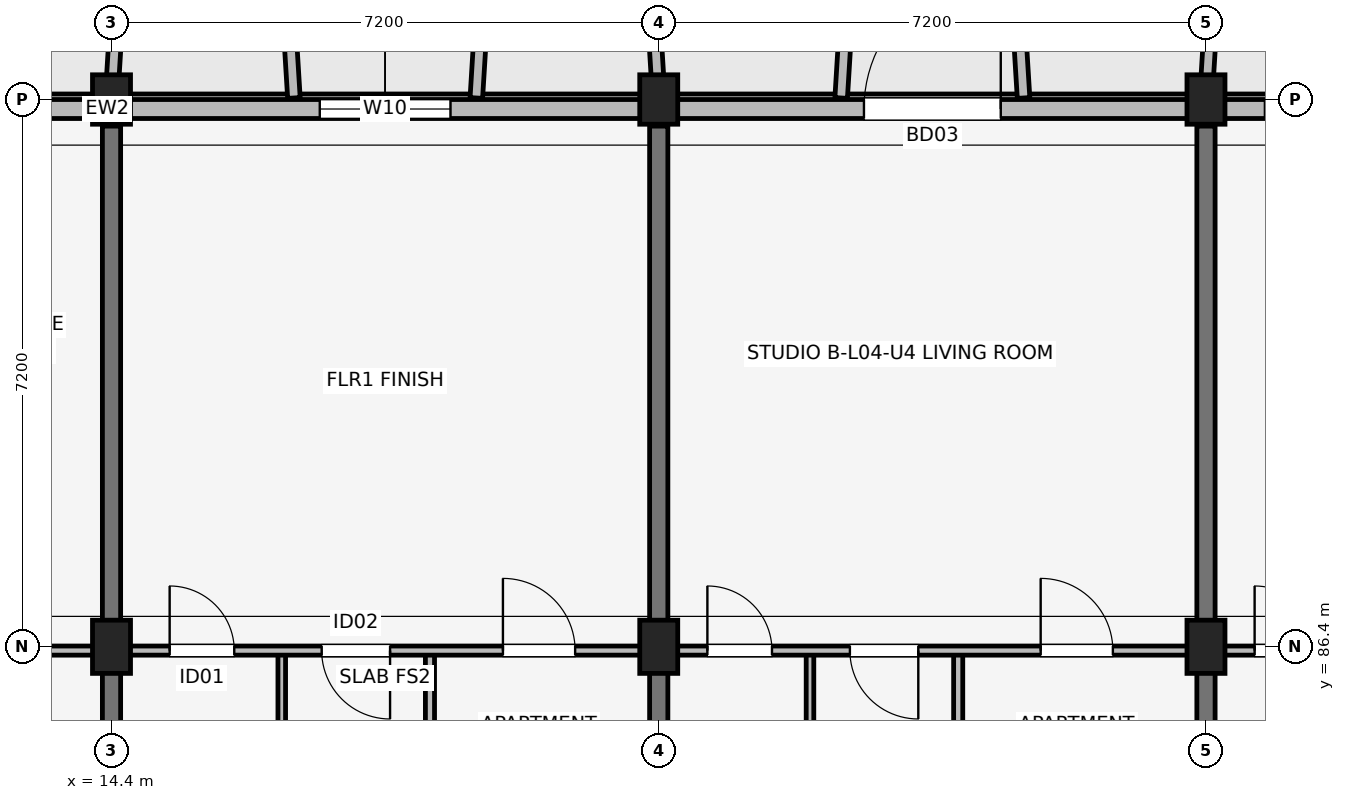
"""IFC4 building model, lengths in metres.
Left out: names, types, materials, properties, quantities, classifications, styles, units other than length and angle.
Written with IfcOpenShell. Run it as: python <this file> out.ifc"""

import sys

from ifc_helpers import new_model, si_unit, direction, frame, frame_2d, origin, origin_2d, place, context, subcontext, project, spatial, rectangle, extrude, element, fill, save


model = new_model("IFC4")
c1 = context("Model", 3, precision=1e-05, world=origin(), true_north=direction((0.0, 1.0)))
c2 = subcontext(c1, "Body", "Model", "MODEL_VIEW")
j1 = project(units=[si_unit("LENGTHUNIT", "METRE"), si_unit("PLANEANGLEUNIT", "RADIAN")], contexts=[c1])
p1 = place(None, origin())
s1 = spatial("IfcSite", under=j1, at=p1, CompositionType="ELEMENT")
p2 = place(p1, origin())
s2 = spatial("IfcBuilding", under=s1, at=p2, CompositionType="ELEMENT")
p3 = place(p2, frame((0.0, 0.0, 15.0)))
s3 = spatial("IfcBuildingStorey", under=s2, at=p3, CompositionType="ELEMENT", Elevation=15.0)
p4 = place(p3, frame((14.4, 86.4, 0.0), z_axis=(0.0, 0.0, 1.0), x_axis=(1.0, 0.0, 0.0)))
e1 = element("IfcColumn", 1, at=p4, inside=s3, PredefinedType="COLUMN", context=c2, shape_type="SweptSolid", body=[
    extrude(rectangle(XDim=0.5, YDim=0.7, at=origin_2d()), origin(), (0.0, 0.0, 1.0), 3.15),
])
p5 = place(p3, frame((14.4, 93.6, 0.0), z_axis=(0.0, 0.0, 1.0), x_axis=(1.0, 0.0, 0.0)))
e2 = element("IfcColumn", 2, at=p5, inside=s3, PredefinedType="COLUMN", context=c2, shape_type="SweptSolid", body=[
    extrude(rectangle(XDim=0.5, YDim=0.65, at=origin_2d()), origin(), (0.0, 0.0, 1.0), 3.15),
])
p6 = place(p3, frame((21.6, 86.4, 0.0), z_axis=(0.0, 0.0, 1.0), x_axis=(1.0, 0.0, 0.0)))
e3 = element("IfcColumn", 3, at=p6, inside=s3, PredefinedType="COLUMN", context=c2, shape_type="SweptSolid", body=[
    extrude(rectangle(XDim=0.5, YDim=0.7, at=origin_2d()), origin(), (0.0, 0.0, 1.0), 3.15),
])
p7 = place(p3, frame((21.6, 93.6, 0.0), z_axis=(0.0, 0.0, 1.0), x_axis=(1.0, 0.0, 0.0)))
e4 = element("IfcColumn", 4, at=p7, inside=s3, PredefinedType="COLUMN", context=c2, shape_type="SweptSolid", body=[
    extrude(rectangle(XDim=0.5, YDim=0.65, at=origin_2d()), origin(), (0.0, 0.0, 1.0), 3.15),
])
p8 = place(p3, frame((28.8, 86.4, 0.0), z_axis=(0.0, 0.0, 1.0), x_axis=(1.0, 0.0, 0.0)))
e5 = element("IfcColumn", 5, at=p8, inside=s3, PredefinedType="COLUMN", context=c2, shape_type="SweptSolid", body=[
    extrude(rectangle(XDim=0.5, YDim=0.7, at=origin_2d()), origin(), (0.0, 0.0, 1.0), 3.15),
])
p9 = place(p3, frame((28.8, 93.6, 0.0), z_axis=(0.0, 0.0, 1.0), x_axis=(1.0, 0.0, 0.0)))
e6 = element("IfcColumn", 6, at=p9, inside=s3, PredefinedType="COLUMN", context=c2, shape_type="SweptSolid", body=[
    extrude(rectangle(XDim=0.5, YDim=0.65, at=origin_2d()), origin(), (0.0, 0.0, 1.0), 3.15),
])
for number, where, z_axis, x_axis in (
    (7, (14.4, 83.85, 0.0), (0.0, 0.0, 1.0), (0.0, 1.0, 0.0)),
    (8, (21.6, 83.85, 0.0), (0.0, 0.0, 1.0), (0.0, 1.0, 0.0)),
    (9, (28.8, 83.85, 0.0), (0.0, 0.0, 1.0), (0.0, 1.0, 0.0)),
):
    element("IfcWall", number, at=place(p3, frame(where, z_axis=z_axis, x_axis=x_axis)), inside=s3, PredefinedType="SHEAR", context=c2, shape_type="SweptSolid", body=[
        extrude(rectangle(XDim=9.4, YDim=0.24, at=frame_2d((4.7, 0.0))), origin(), (0.0, 0.0, 1.0), 3.15),
    ])
p10 = place(p3, frame((32.8, 93.475, 0.0), z_axis=(0.0, 0.0, 1.0), x_axis=(-1.0, 0.0, 0.0)))
e10 = element("IfcWall", 10, at=p10, inside=s3, PredefinedType="SOLIDWALL", context=c2, shape_type="SweptSolid", body=[
    extrude(rectangle(XDim=29.6, YDim=0.25, at=frame_2d((14.8, 0.0))), origin(), (0.0, 0.0, 1.0), 2.43),
])
p11 = place(p10, frame((22.75, 0.0, 0.0), z_axis=(0.0, 0.0, 1.0), x_axis=(-1.0, 0.0, 0.0)))
e11 = element("IfcOpeningElement", 11, at=p11, cuts=e10, PredefinedType="OPENING", context=c2, shape_type="SweptSolid", body=[
    extrude(rectangle(XDim=1.5, YDim=2.15, at=frame_2d((0.75, 1.075))), frame((0.0, 0.135, 0.0), z_axis=(0.0, -1.0, 0.0), x_axis=(1.0, 0.0, 0.0)), (0.0, 0.0, 1.0), 0.27),
])
p12 = place(p10, frame((8.5, 0.0, 0.0), z_axis=(0.0, 0.0, 1.0), x_axis=(-1.0, 0.0, 0.0)))
e12 = element("IfcOpeningElement", 12, at=p12, cuts=e10, PredefinedType="OPENING", context=c2, shape_type="SweptSolid", body=[
    extrude(rectangle(XDim=1.8, YDim=2.15, at=frame_2d((0.9, 1.075))), frame((0.0, 0.135, 0.0), z_axis=(0.0, -1.0, 0.0), x_axis=(1.0, 0.0, 0.0)), (0.0, 0.0, 1.0), 0.27),
])
p13 = place(p10, frame((26.015, 0.0, 0.7)))
e13 = element("IfcOpeningElement", 13, at=p13, cuts=e10, PredefinedType="OPENING", context=c2, shape_type="SweptSolid", body=[
    extrude(rectangle(XDim=1.86, YDim=1.6, at=frame_2d((0.93, 0.8))), frame((0.0, 0.135, 0.0), z_axis=(0.0, -1.0, 0.0), x_axis=(1.0, 0.0, 0.0)), (0.0, 0.0, 1.0), 0.27),
])
p14 = place(p10, frame((23.61, 0.0, 0.75)))
e14 = element("IfcOpeningElement", 14, at=p14, cuts=e10, PredefinedType="OPENING", context=c2, shape_type="SweptSolid", body=[
    extrude(rectangle(XDim=1.46, YDim=1.55, at=frame_2d((0.73, 0.775))), frame((0.0, 0.135, 0.0), z_axis=(0.0, -1.0, 0.0), x_axis=(1.0, 0.0, 0.0)), (0.0, 0.0, 1.0), 0.27),
])
p15 = place(p10, frame((13.94, 0.0, 0.7)))
e15 = element("IfcOpeningElement", 15, at=p15, cuts=e10, PredefinedType="OPENING", context=c2, shape_type="SweptSolid", body=[
    extrude(rectangle(XDim=1.72, YDim=1.6, at=frame_2d((0.86, 0.8))), frame((0.0, 0.135, 0.0), z_axis=(0.0, -1.0, 0.0), x_axis=(1.0, 0.0, 0.0)), (0.0, 0.0, 1.0), 0.27),
])
p16 = place(p10, frame((2.505, 0.0, 0.75)))
e16 = element("IfcOpeningElement", 16, at=p16, cuts=e10, PredefinedType="OPENING", context=c2, shape_type="SweptSolid", body=[
    extrude(rectangle(XDim=0.72, YDim=1.35, at=frame_2d((0.36, 0.675))), frame((0.0, 0.135, 0.0), z_axis=(0.0, -1.0, 0.0), x_axis=(1.0, 0.0, 0.0)), (0.0, 0.0, 1.0), 0.27),
])
p17 = place(p10, frame((0.46, 0.0, 0.75)))
e17 = element("IfcOpeningElement", 17, at=p17, cuts=e10, PredefinedType="OPENING", context=c2, shape_type="SweptSolid", body=[
    extrude(rectangle(XDim=0.85, YDim=1.4, at=frame_2d((0.425, 0.7))), frame((0.0, 0.135, 0.0), z_axis=(0.0, -1.0, 0.0), x_axis=(1.0, 0.0, 0.0)), (0.0, 0.0, 1.0), 0.27),
])
p18 = place(p3, frame((14.4, 93.62, 0.0), z_axis=(0.0, 0.0, 1.0), x_axis=(0.061170732449, 0.998127317276, 0.0)))
e18 = element("IfcWall", 18, at=p18, inside=s3, PredefinedType="ELEMENTEDWALL", context=c2, shape_type="SweptSolid", body=[
    extrude(rectangle(XDim=1.964, YDim=0.165, at=frame_2d((0.982, 0.0))), origin(), (0.0, 0.0, 1.0), 2.95),
])
for number, where, z_axis, x_axis in (
    (19, (16.8, 93.62, 0.0), (0.0, 0.0, 1.0), (-0.061, 0.998, 0.0)),
    (20, (19.2, 93.62, 0.0), (0.0, 0.0, 1.0), (0.061, 0.998, 0.0)),
):
    element("IfcWall", number, at=place(p3, frame(where, z_axis=z_axis, x_axis=x_axis)), inside=s3, PredefinedType="ELEMENTEDWALL", context=c2, shape_type="SweptSolid", body=[
        extrude(rectangle(XDim=1.964, YDim=0.165, at=frame_2d((0.982, 0.0))), origin(), (0.0, 0.0, 1.0), 2.53),
    ])
p19 = place(p3, frame((21.6, 93.62, 0.0), z_axis=(0.0, 0.0, 1.0), x_axis=(-0.061170732449, 0.998127317276, 0.0)))
e21 = element("IfcWall", 21, at=p19, inside=s3, PredefinedType="ELEMENTEDWALL", context=c2, shape_type="SweptSolid", body=[
    extrude(rectangle(XDim=1.964, YDim=0.165, at=frame_2d((0.982, 0.0))), origin(), (0.0, 0.0, 1.0), 2.95),
])
for number, where, z_axis, x_axis in (
    (22, (24.0, 93.62, 0.0), (0.0, 0.0, 1.0), (0.061, 0.998, 0.0)),
    (23, (26.4, 93.62, 0.0), (0.0, 0.0, 1.0), (-0.061, 0.998, 0.0)),
):
    element("IfcWall", number, at=place(p3, frame(where, z_axis=z_axis, x_axis=x_axis)), inside=s3, PredefinedType="ELEMENTEDWALL", context=c2, shape_type="SweptSolid", body=[
        extrude(rectangle(XDim=1.964, YDim=0.165, at=frame_2d((0.982, 0.0))), origin(), (0.0, 0.0, 1.0), 2.48),
    ])
p20 = place(p3, frame((28.8, 93.62, 0.0), z_axis=(0.0, 0.0, 1.0), x_axis=(0.061046865508, 0.998134900808, 0.0)))
e24 = element("IfcWall", 24, at=p20, inside=s3, PredefinedType="ELEMENTEDWALL", context=c2, shape_type="SweptSolid", body=[
    extrude(rectangle(XDim=1.964, YDim=0.165, at=frame_2d((0.982, 0.0))), origin(), (0.0, 0.0, 1.0), 2.95),
])
p21 = place(p3, frame((7.34, 86.35, 0.0), z_axis=(0.0, 0.0, 1.0), x_axis=(1.0, 0.0, 0.0)))
e25 = element("IfcWall", 25, at=p21, inside=s3, PredefinedType="PARTITIONING", context=c2, shape_type="SweptSolid", body=[
    extrude(rectangle(XDim=6.92, YDim=0.12, at=frame_2d((3.46, 0.0))), origin(), (0.0, 0.0, 1.0), 2.375),
])
p22 = place(p21, frame((1.475, 0.0, 0.0), z_axis=(0.0, 0.0, 1.0), x_axis=(-1.0, 0.0, 0.0)))
e26 = element("IfcOpeningElement", 26, at=p22, cuts=e25, PredefinedType="OPENING", context=c2, shape_type="SweptSolid", body=[
    extrude(rectangle(XDim=0.85, YDim=2.08, at=frame_2d((0.425, 1.04))), frame((0.0, 0.07, 0.0), z_axis=(0.0, -1.0, 0.0), x_axis=(1.0, 0.0, 0.0)), (0.0, 0.0, 1.0), 0.14),
])
p23 = place(p21, frame((2.775, 0.0, 0.0)))
e27 = element("IfcOpeningElement", 27, at=p23, cuts=e25, PredefinedType="OPENING", context=c2, shape_type="SweptSolid", body=[
    extrude(rectangle(XDim=0.9, YDim=2.08, at=frame_2d((0.45, 1.04))), frame((0.0, 0.07, 0.0), z_axis=(0.0, -1.0, 0.0), x_axis=(1.0, 0.0, 0.0)), (0.0, 0.0, 1.0), 0.14),
])
p24 = place(p21, frame((6.11, 0.0, 0.0), z_axis=(0.0, 0.0, 1.0), x_axis=(-1.0, 0.0, 0.0)))
e28 = element("IfcOpeningElement", 28, at=p24, cuts=e25, PredefinedType="OPENING", context=c2, shape_type="SweptSolid", body=[
    extrude(rectangle(XDim=0.95, YDim=2.08, at=frame_2d((0.475, 1.04))), frame((0.0, 0.07, 0.0), z_axis=(0.0, -1.0, 0.0), x_axis=(1.0, 0.0, 0.0)), (0.0, 0.0, 1.0), 0.14),
])
p25 = place(p3, frame((16.64, 83.7, 0.0), z_axis=(0.0, 0.0, 1.0), x_axis=(0.0, 1.0, 0.0)))
e29 = element("IfcWall", 29, at=p25, inside=s3, PredefinedType="PARTITIONING", context=c2, shape_type="SweptSolid", body=[
    extrude(rectangle(XDim=2.65, YDim=0.1, at=frame_2d((1.325, 0.0))), origin(), (0.0, 0.0, 1.0), 2.375),
])
p26 = place(p3, frame((18.59, 83.7, 0.0), z_axis=(0.0, 0.0, 1.0), x_axis=(0.0, 1.0, 0.0)))
e30 = element("IfcWall", 30, at=p26, inside=s3, PredefinedType="PARTITIONING", context=c2, shape_type="SweptSolid", body=[
    extrude(rectangle(XDim=2.65, YDim=0.12, at=frame_2d((1.325, 0.0))), origin(), (0.0, 0.0, 1.0), 2.375),
])
p27 = place(p3, frame((14.54, 86.35, 0.0), z_axis=(0.0, 0.0, 1.0), x_axis=(1.0, 0.0, 0.0)))
e31 = element("IfcWall", 31, at=p27, inside=s3, PredefinedType="PARTITIONING", context=c2, shape_type="SweptSolid", body=[
    extrude(rectangle(XDim=6.92, YDim=0.12, at=frame_2d((3.46, 0.0))), origin(), (0.0, 0.0, 1.0), 2.375),
])
p28 = place(p27, frame((0.625, 0.0, 0.0)))
e32 = element("IfcOpeningElement", 32, at=p28, cuts=e31, PredefinedType="OPENING", context=c2, shape_type="SweptSolid", body=[
    extrude(rectangle(XDim=0.85, YDim=2.08, at=frame_2d((0.425, 1.04))), frame((0.0, 0.07, 0.0), z_axis=(0.0, -1.0, 0.0), x_axis=(1.0, 0.0, 0.0)), (0.0, 0.0, 1.0), 0.14),
])
p29 = place(p27, frame((3.525, 0.0, 0.0), z_axis=(0.0, 0.0, 1.0), x_axis=(-1.0, 0.0, 0.0)))
e33 = element("IfcOpeningElement", 33, at=p29, cuts=e31, PredefinedType="OPENING", context=c2, shape_type="SweptSolid", body=[
    extrude(rectangle(XDim=0.9, YDim=2.08, at=frame_2d((0.45, 1.04))), frame((0.0, 0.07, 0.0), z_axis=(0.0, -1.0, 0.0), x_axis=(1.0, 0.0, 0.0)), (0.0, 0.0, 1.0), 0.14),
])
p30 = place(p27, frame((5.01, 0.0, 0.0)))
e34 = element("IfcOpeningElement", 34, at=p30, cuts=e31, PredefinedType="OPENING", context=c2, shape_type="SweptSolid", body=[
    extrude(rectangle(XDim=0.95, YDim=2.08, at=frame_2d((0.475, 1.04))), frame((0.0, 0.07, 0.0), z_axis=(0.0, -1.0, 0.0), x_axis=(1.0, 0.0, 0.0)), (0.0, 0.0, 1.0), 0.14),
])
p31 = place(p3, frame((23.59, 83.7, 0.0), z_axis=(0.0, 0.0, 1.0), x_axis=(0.0, 1.0, 0.0)))
e35 = element("IfcWall", 35, at=p31, inside=s3, PredefinedType="PARTITIONING", context=c2, shape_type="SweptSolid", body=[
    extrude(rectangle(XDim=2.65, YDim=0.1, at=frame_2d((1.325, 0.0))), origin(), (0.0, 0.0, 1.0), 2.375),
])
p32 = place(p3, frame((25.54, 83.7, 0.0), z_axis=(0.0, 0.0, 1.0), x_axis=(0.0, 1.0, 0.0)))
e36 = element("IfcWall", 36, at=p32, inside=s3, PredefinedType="PARTITIONING", context=c2, shape_type="SweptSolid", body=[
    extrude(rectangle(XDim=2.65, YDim=0.12, at=frame_2d((1.325, 0.0))), origin(), (0.0, 0.0, 1.0), 2.375),
])
p33 = place(p3, frame((21.74, 86.35, 0.0), z_axis=(0.0, 0.0, 1.0), x_axis=(1.0, 0.0, 0.0)))
e37 = element("IfcWall", 37, at=p33, inside=s3, PredefinedType="PARTITIONING", context=c2, shape_type="SweptSolid", body=[
    extrude(rectangle(XDim=6.92, YDim=0.12, at=frame_2d((3.46, 0.0))), origin(), (0.0, 0.0, 1.0), 2.375),
])
p34 = place(p33, frame((0.5, 0.0, 0.0)))
e38 = element("IfcOpeningElement", 38, at=p34, cuts=e37, PredefinedType="OPENING", context=c2, shape_type="SweptSolid", body=[
    extrude(rectangle(XDim=0.85, YDim=2.08, at=frame_2d((0.425, 1.04))), frame((0.0, 0.07, 0.0), z_axis=(0.0, -1.0, 0.0), x_axis=(1.0, 0.0, 0.0)), (0.0, 0.0, 1.0), 0.14),
])
p35 = place(p33, frame((3.275, 0.0, 0.0), z_axis=(0.0, 0.0, 1.0), x_axis=(-1.0, 0.0, 0.0)))
e39 = element("IfcOpeningElement", 39, at=p35, cuts=e37, PredefinedType="OPENING", context=c2, shape_type="SweptSolid", body=[
    extrude(rectangle(XDim=0.9, YDim=2.08, at=frame_2d((0.45, 1.04))), frame((0.0, 0.07, 0.0), z_axis=(0.0, -1.0, 0.0), x_axis=(1.0, 0.0, 0.0)), (0.0, 0.0, 1.0), 0.14),
])
p36 = place(p33, frame((4.885, 0.0, 0.0)))
e40 = element("IfcOpeningElement", 40, at=p36, cuts=e37, PredefinedType="OPENING", context=c2, shape_type="SweptSolid", body=[
    extrude(rectangle(XDim=0.95, YDim=2.08, at=frame_2d((0.475, 1.04))), frame((0.0, 0.07, 0.0), z_axis=(0.0, -1.0, 0.0), x_axis=(1.0, 0.0, 0.0)), (0.0, 0.0, 1.0), 0.14),
])
p37 = place(p3, frame((28.94, 86.35, 0.0), z_axis=(0.0, 0.0, 1.0), x_axis=(1.0, 0.0, 0.0)))
e41 = element("IfcWall", 41, at=p37, inside=s3, PredefinedType="PARTITIONING", context=c2, shape_type="SweptSolid", body=[
    extrude(rectangle(XDim=6.92, YDim=0.12, at=frame_2d((3.46, 0.0))), origin(), (0.0, 0.0, 1.0), 2.375),
])
p38 = place(p37, frame((0.5, 0.0, 0.0)))
e42 = element("IfcOpeningElement", 42, at=p38, cuts=e41, PredefinedType="OPENING", context=c2, shape_type="SweptSolid", body=[
    extrude(rectangle(XDim=0.85, YDim=2.08, at=frame_2d((0.425, 1.04))), frame((0.0, 0.07, 0.0), z_axis=(0.0, -1.0, 0.0), x_axis=(1.0, 0.0, 0.0)), (0.0, 0.0, 1.0), 0.14),
])
p39 = place(p37, frame((3.155, 0.0, 0.0), z_axis=(0.0, 0.0, 1.0), x_axis=(-1.0, 0.0, 0.0)))
e43 = element("IfcOpeningElement", 43, at=p39, cuts=e41, PredefinedType="OPENING", context=c2, shape_type="SweptSolid", body=[
    extrude(rectangle(XDim=0.9, YDim=2.08, at=frame_2d((0.45, 1.04))), frame((0.0, 0.07, 0.0), z_axis=(0.0, -1.0, 0.0), x_axis=(1.0, 0.0, 0.0)), (0.0, 0.0, 1.0), 0.14),
])
p40 = place(p37, frame((3.91, 0.0, 0.0)))
e44 = element("IfcOpeningElement", 44, at=p40, cuts=e41, PredefinedType="OPENING", context=c2, shape_type="SweptSolid", body=[
    extrude(rectangle(XDim=0.95, YDim=2.08, at=frame_2d((0.475, 1.04))), frame((0.0, 0.07, 0.0), z_axis=(0.0, -1.0, 0.0), x_axis=(1.0, 0.0, 0.0)), (0.0, 0.0, 1.0), 0.14),
])
p41 = place(p12, origin())
e45 = element("IfcDoor", 45, at=p41, inside=s3, OperationType="SINGLE_SWING_LEFT", PredefinedType="DOOR", context=c2, shape_type="SweptSolid", body=[
    extrude(rectangle(XDim=1.8, YDim=2.15, at=frame_2d((0.9, 1.075))), frame((0.0, 0.025, 0.0), z_axis=(0.0, -1.0, 0.0), x_axis=(1.0, 0.0, 0.0)), (0.0, 0.0, 1.0), 0.05),
])
fill(e12, e45)
p42 = place(p15, origin())
e46 = element("IfcWindow", 46, at=p42, inside=s3, PartitioningType="SINGLE_PANEL", PredefinedType="WINDOW", context=c2, shape_type="SweptSolid", body=[
    extrude(rectangle(XDim=1.72, YDim=1.6, at=frame_2d((0.86, 0.8))), frame((0.0, 0.03, 0.0), z_axis=(0.0, -1.0, 0.0), x_axis=(1.0, 0.0, 0.0)), (0.0, 0.0, 1.0), 0.06),
])
fill(e15, e46)
p43 = place(p16, origin())
e47 = element("IfcWindow", 47, at=p43, inside=s3, PartitioningType="SINGLE_PANEL", PredefinedType="WINDOW", context=c2, shape_type="SweptSolid", body=[
    extrude(rectangle(XDim=0.72, YDim=1.35, at=frame_2d((0.36, 0.675))), frame((0.0, 0.03, 0.0), z_axis=(0.0, -1.0, 0.0), x_axis=(1.0, 0.0, 0.0)), (0.0, 0.0, 1.0), 0.06),
])
fill(e16, e47)
p44 = place(p28, origin())
e48 = element("IfcDoor", 48, at=p44, inside=s3, OperationType="SINGLE_SWING_LEFT", PredefinedType="DOOR", context=c2, shape_type="SweptSolid", body=[
    extrude(rectangle(XDim=0.85, YDim=2.08, at=frame_2d((0.425, 1.04))), frame((0.0, 0.025, 0.0), z_axis=(0.0, -1.0, 0.0), x_axis=(1.0, 0.0, 0.0)), (0.0, 0.0, 1.0), 0.05),
])
fill(e32, e48)
p45 = place(p29, origin())
e49 = element("IfcDoor", 49, at=p45, inside=s3, OperationType="SINGLE_SWING_RIGHT", PredefinedType="DOOR", context=c2, shape_type="SweptSolid", body=[
    extrude(rectangle(XDim=0.9, YDim=2.08, at=frame_2d((0.45, 1.04))), frame((0.0, 0.025, 0.0), z_axis=(0.0, -1.0, 0.0), x_axis=(1.0, 0.0, 0.0)), (0.0, 0.0, 1.0), 0.05),
])
fill(e33, e49)
p46 = place(p30, origin())
e50 = element("IfcDoor", 50, at=p46, inside=s3, OperationType="SINGLE_SWING_LEFT", PredefinedType="DOOR", context=c2, shape_type="SweptSolid", body=[
    extrude(rectangle(XDim=0.95, YDim=2.08, at=frame_2d((0.475, 1.04))), frame((0.0, 0.025, 0.0), z_axis=(0.0, -1.0, 0.0), x_axis=(1.0, 0.0, 0.0)), (0.0, 0.0, 1.0), 0.05),
])
fill(e34, e50)
p47 = place(p34, origin())
e51 = element("IfcDoor", 51, at=p47, inside=s3, OperationType="SINGLE_SWING_LEFT", PredefinedType="DOOR", context=c2, shape_type="SweptSolid", body=[
    extrude(rectangle(XDim=0.85, YDim=2.08, at=frame_2d((0.425, 1.04))), frame((0.0, 0.025, 0.0), z_axis=(0.0, -1.0, 0.0), x_axis=(1.0, 0.0, 0.0)), (0.0, 0.0, 1.0), 0.05),
])
fill(e38, e51)
p48 = place(p35, origin())
e52 = element("IfcDoor", 52, at=p48, inside=s3, OperationType="SINGLE_SWING_RIGHT", PredefinedType="DOOR", context=c2, shape_type="SweptSolid", body=[
    extrude(rectangle(XDim=0.9, YDim=2.08, at=frame_2d((0.45, 1.04))), frame((0.0, 0.025, 0.0), z_axis=(0.0, -1.0, 0.0), x_axis=(1.0, 0.0, 0.0)), (0.0, 0.0, 1.0), 0.05),
])
fill(e39, e52)
p49 = place(p36, origin())
e53 = element("IfcDoor", 53, at=p49, inside=s3, OperationType="SINGLE_SWING_LEFT", PredefinedType="DOOR", context=c2, shape_type="SweptSolid", body=[
    extrude(rectangle(XDim=0.95, YDim=2.08, at=frame_2d((0.475, 1.04))), frame((0.0, 0.025, 0.0), z_axis=(0.0, -1.0, 0.0), x_axis=(1.0, 0.0, 0.0)), (0.0, 0.0, 1.0), 0.05),
])
fill(e40, e53)
p50 = place(p38, origin())
e54 = element("IfcDoor", 54, at=p50, inside=s3, OperationType="SINGLE_SWING_LEFT", PredefinedType="DOOR", context=c2, shape_type="SweptSolid", body=[
    extrude(rectangle(XDim=0.85, YDim=2.08, at=frame_2d((0.425, 1.04))), frame((0.0, 0.025, 0.0), z_axis=(0.0, -1.0, 0.0), x_axis=(1.0, 0.0, 0.0)), (0.0, 0.0, 1.0), 0.05),
])
fill(e42, e54)
save(model, sys.argv[1])
